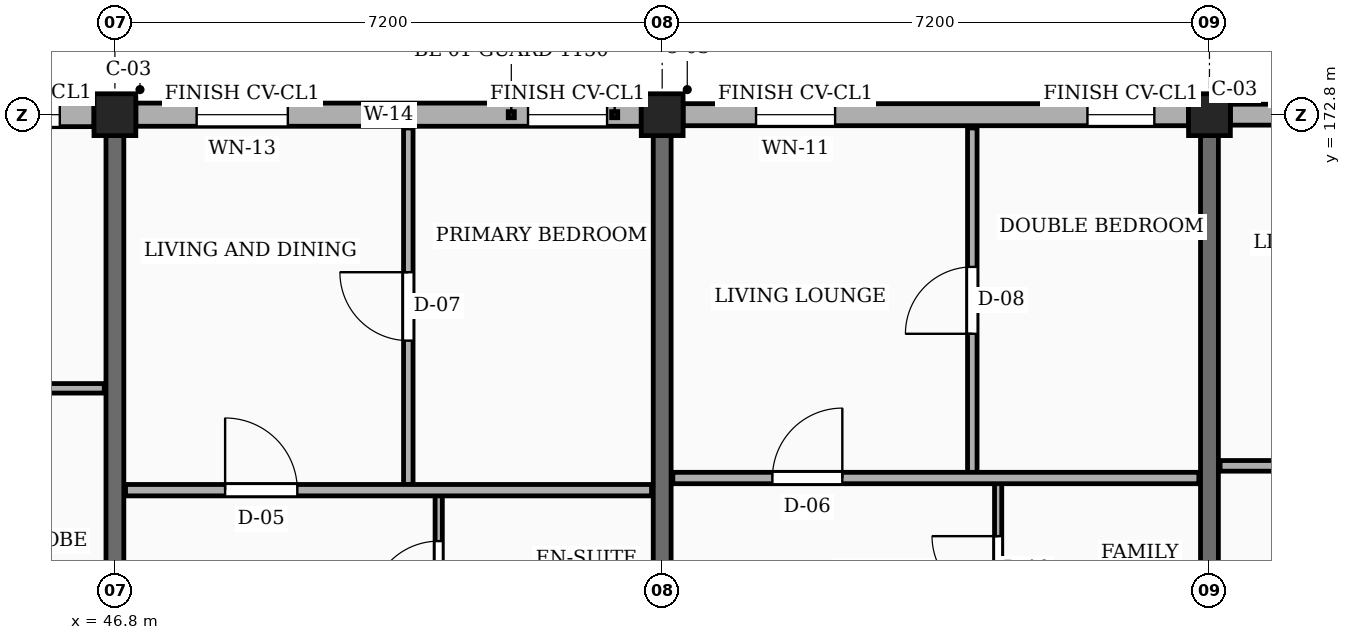
"""IFC4 building model, lengths in metres.
Left out: names, types, materials, properties, quantities, classifications, styles, units other than length and angle.
Written with IfcOpenShell. Run it as: python <this file> out.ifc"""

import sys

from ifc_helpers import new_model, si_unit, direction, frame, frame_2d, origin, origin_2d, place, context, subcontext, project, spatial, rectangle, extrude, element, fill, save


model = new_model("IFC4")
c1 = context("Model", 3, precision=1e-05, world=origin(), true_north=direction((0.0, 1.0)))
c2 = subcontext(c1, "Body", "Model", "MODEL_VIEW")
j1 = project(units=[si_unit("LENGTHUNIT", "METRE"), si_unit("PLANEANGLEUNIT", "RADIAN")], contexts=[c1])
p1 = place(None, origin())
s1 = spatial("IfcSite", under=j1, at=p1, CompositionType="ELEMENT")
p2 = place(p1, origin())
s2 = spatial("IfcBuilding", under=s1, at=p2, CompositionType="ELEMENT")
p3 = place(p2, frame((0.0, 0.0, 13.95)))
s3 = spatial("IfcBuildingStorey", under=s2, at=p3, CompositionType="ELEMENT", Elevation=13.95)
for number, where, z_axis, x_axis in (
    (1, (46.8, 172.8, 0.0), (0.0, 0.0, 1.0), (1.0, 0.0, 0.0)),
    (2, (54.0, 172.8, 0.0), (0.0, 0.0, 1.0), (1.0, 0.0, 0.0)),
    (3, (61.2, 172.8, 0.0), (0.0, 0.0, 1.0), (1.0, 0.0, 0.0)),
):
    element("IfcColumn", number, at=place(p3, frame(where, z_axis=z_axis, x_axis=x_axis)), inside=s3, PredefinedType="COLUMN", context=c2, shape_type="SweptSolid", body=[
        extrude(rectangle(XDim=0.55, YDim=0.55, at=origin_2d()), origin(), (0.0, 0.0, 1.0), 3.15),
    ])
for number, where, z_axis, x_axis in (
    (4, (46.8, 165.925, 0.0), (0.0, 0.0, 1.0), (0.0, 1.0, 0.0)),
    (5, (54.0, 165.925, 0.0), (0.0, 0.0, 1.0), (0.0, 1.0, 0.0)),
    (6, (61.2, 165.925, 0.0), (0.0, 0.0, 1.0), (0.0, 1.0, 0.0)),
):
    element("IfcWall", number, at=place(p3, frame(where, z_axis=z_axis, x_axis=x_axis)), inside=s3, PredefinedType="SOLIDWALL", context=c2, shape_type="SweptSolid", body=[
        extrude(rectangle(XDim=6.6, YDim=0.235, at=frame_2d((3.3, 0.0))), origin(), (0.0, 0.0, 1.0), 2.185),
    ])
p4 = place(p3, frame((68.125, 172.8, 0.0), z_axis=(0.0, 0.0, 1.0), x_axis=(-1.0, 0.0, 0.0)))
e7 = element("IfcWall", 7, at=p4, inside=s3, PredefinedType="SOLIDWALL", context=c2, shape_type="SweptSolid", body=[
    extrude(rectangle(XDim=6.65, YDim=0.275, at=frame_2d((3.325, 0.0))), origin(), (0.0, 0.0, 1.0), 2.455),
])
p5 = place(p4, frame((0.45, 0.0, 0.78)))
e8 = element("IfcOpeningElement", 8, at=p5, cuts=e7, PredefinedType="OPENING", context=c2, shape_type="SweptSolid", body=[
    extrude(rectangle(XDim=1.32, YDim=1.15, at=frame_2d((0.66, 0.575))), frame((0.0, 0.147, 0.0), z_axis=(0.0, -1.0, 0.0), x_axis=(1.0, 0.0, 0.0)), (0.0, 0.0, 1.0), 0.295),
])
p6 = place(p4, frame((4.65, 0.0, 0.78)))
e9 = element("IfcOpeningElement", 9, at=p6, cuts=e7, PredefinedType="OPENING", context=c2, shape_type="SweptSolid", body=[
    extrude(rectangle(XDim=0.88, YDim=1.26, at=frame_2d((0.44, 0.63))), frame((0.0, 0.147, 0.0), z_axis=(0.0, -1.0, 0.0), x_axis=(1.0, 0.0, 0.0)), (0.0, 0.0, 1.0), 0.295),
])
p7 = place(p3, frame((60.925, 172.8, 0.0), z_axis=(0.0, 0.0, 1.0), x_axis=(-1.0, 0.0, 0.0)))
e10 = element("IfcWall", 10, at=p7, inside=s3, PredefinedType="SOLIDWALL", context=c2, shape_type="SweptSolid", body=[
    extrude(rectangle(XDim=6.65, YDim=0.29, at=frame_2d((3.325, 0.0))), origin(), (0.0, 0.0, 1.0), 2.455),
])
p8 = place(p7, frame((0.45, 0.0, 0.78)))
e11 = element("IfcOpeningElement", 11, at=p8, cuts=e10, PredefinedType="OPENING", context=c2, shape_type="SweptSolid", body=[
    extrude(rectangle(XDim=0.88, YDim=1.26, at=frame_2d((0.44, 0.63))), frame((0.0, 0.155, 0.0), z_axis=(0.0, -1.0, 0.0), x_axis=(1.0, 0.0, 0.0)), (0.0, 0.0, 1.0), 0.31),
])
p9 = place(p7, frame((4.65, 0.0, 0.78)))
e12 = element("IfcOpeningElement", 12, at=p9, cuts=e10, PredefinedType="OPENING", context=c2, shape_type="SweptSolid", body=[
    extrude(rectangle(XDim=1.04, YDim=1.26, at=frame_2d((0.52, 0.63))), frame((0.0, 0.155, 0.0), z_axis=(0.0, -1.0, 0.0), x_axis=(1.0, 0.0, 0.0)), (0.0, 0.0, 1.0), 0.31),
])
p10 = place(p3, frame((53.725, 172.8, 0.0), z_axis=(0.0, 0.0, 1.0), x_axis=(-1.0, 0.0, 0.0)))
e13 = element("IfcWall", 13, at=p10, inside=s3, PredefinedType="SOLIDWALL", context=c2, shape_type="SweptSolid", body=[
    extrude(rectangle(XDim=6.65, YDim=0.305, at=frame_2d((3.325, 0.0))), origin(), (0.0, 0.0, 1.0), 2.455),
])
p11 = place(p10, frame((0.45, 0.0, 0.78)))
e14 = element("IfcOpeningElement", 14, at=p11, cuts=e13, PredefinedType="OPENING", context=c2, shape_type="SweptSolid", body=[
    extrude(rectangle(XDim=1.04, YDim=1.26, at=frame_2d((0.52, 0.63))), frame((0.0, 0.163, 0.0), z_axis=(0.0, -1.0, 0.0), x_axis=(1.0, 0.0, 0.0)), (0.0, 0.0, 1.0), 0.325),
])
p12 = place(p10, frame((4.65, 0.0, 0.78)))
e15 = element("IfcOpeningElement", 15, at=p12, cuts=e13, PredefinedType="OPENING", context=c2, shape_type="SweptSolid", body=[
    extrude(rectangle(XDim=1.2, YDim=1.26, at=frame_2d((0.6, 0.63))), frame((0.0, 0.163, 0.0), z_axis=(0.0, -1.0, 0.0), x_axis=(1.0, 0.0, 0.0)), (0.0, 0.0, 1.0), 0.325),
])
p13 = place(p3, frame((46.525, 172.8, 0.0), z_axis=(0.0, 0.0, 1.0), x_axis=(-1.0, 0.0, 0.0)))
e16 = element("IfcWall", 16, at=p13, inside=s3, PredefinedType="SOLIDWALL", context=c2, shape_type="SweptSolid", body=[
    extrude(rectangle(XDim=6.65, YDim=0.315, at=frame_2d((3.325, 0.0))), origin(), (0.0, 0.0, 1.0), 2.455),
])
p14 = place(p13, frame((0.45, 0.0, 0.78)))
e17 = element("IfcOpeningElement", 17, at=p14, cuts=e16, PredefinedType="OPENING", context=c2, shape_type="SweptSolid", body=[
    extrude(rectangle(XDim=1.2, YDim=1.26, at=frame_2d((0.6, 0.63))), frame((0.0, 0.167, 0.0), z_axis=(0.0, -1.0, 0.0), x_axis=(1.0, 0.0, 0.0)), (0.0, 0.0, 1.0), 0.335),
])
p15 = place(p13, frame((4.65, 0.0, 0.78)))
e18 = element("IfcOpeningElement", 18, at=p15, cuts=e16, PredefinedType="OPENING", context=c2, shape_type="SweptSolid", body=[
    extrude(rectangle(XDim=1.36, YDim=1.26, at=frame_2d((0.68, 0.63))), frame((0.0, 0.167, 0.0), z_axis=(0.0, -1.0, 0.0), x_axis=(1.0, 0.0, 0.0)), (0.0, 0.0, 1.0), 0.335),
])
p16 = place(p3, frame((39.74, 169.2, 0.0), z_axis=(0.0, 0.0, 1.0), x_axis=(1.0, 0.0, 0.0)))
e19 = element("IfcWall", 19, at=p16, inside=s3, PredefinedType="PARTITIONING", context=c2, shape_type="SweptSolid", body=[
    extrude(rectangle(XDim=6.92, YDim=0.125, at=frame_2d((3.46, 0.0))), origin(), (0.0, 0.0, 1.0), 2.32),
])
p17 = place(p16, frame((1.05, 0.0, 0.0)))
e20 = element("IfcOpeningElement", 20, at=p17, cuts=e19, PredefinedType="OPENING", context=c2, shape_type="SweptSolid", body=[
    extrude(rectangle(XDim=0.87, YDim=2.05, at=frame_2d((0.435, 1.025))), frame((0.0, 0.073, 0.0), z_axis=(0.0, -1.0, 0.0), x_axis=(1.0, 0.0, 0.0)), (0.0, 0.0, 1.0), 0.145),
])
p18 = place(p16, frame((4.45, 0.0, 0.0)))
e21 = element("IfcOpeningElement", 21, at=p18, cuts=e19, PredefinedType="OPENING", context=c2, shape_type="SweptSolid", body=[
    extrude(rectangle(XDim=0.88, YDim=2.08, at=frame_2d((0.44, 1.04))), frame((0.0, 0.073, 0.0), z_axis=(0.0, -1.0, 0.0), x_axis=(1.0, 0.0, 0.0)), (0.0, 0.0, 1.0), 0.145),
])
p19 = place(p3, frame((50.66, 167.93, 0.0), z_axis=(0.0, 0.0, 1.0), x_axis=(0.0, 1.0, 0.0)))
e22 = element("IfcWall", 22, at=p19, inside=s3, PredefinedType="PARTITIONING", context=c2, shape_type="SweptSolid", body=[
    extrude(rectangle(XDim=4.695, YDim=0.125, at=frame_2d((2.348, 0.0))), origin(), (0.0, 0.0, 1.0), 2.32),
])
p20 = place(p19, frame((1.897, 0.0, 0.0)))
e23 = element("IfcOpeningElement", 23, at=p20, cuts=e22, PredefinedType="OPENING", context=c2, shape_type="SweptSolid", body=[
    extrude(rectangle(XDim=0.9, YDim=2.1, at=frame_2d((0.45, 1.05))), frame((0.0, 0.073, 0.0), z_axis=(0.0, -1.0, 0.0), x_axis=(1.0, 0.0, 0.0)), (0.0, 0.0, 1.0), 0.145),
])
p21 = place(p3, frame((51.06, 165.69, 0.0), z_axis=(0.0, 0.0, 1.0), x_axis=(0.0, 1.0, 0.0)))
e24 = element("IfcWall", 24, at=p21, inside=s3, PredefinedType="PARTITIONING", context=c2, shape_type="SweptSolid", body=[
    extrude(rectangle(XDim=2.1, YDim=0.095, at=frame_2d((1.05, 0.0))), origin(), (0.0, 0.0, 1.0), 2.32),
])
p22 = place(p21, frame((0.6, 0.0, 0.0)))
e25 = element("IfcOpeningElement", 25, at=p22, cuts=e24, PredefinedType="OPENING", context=c2, shape_type="SweptSolid", body=[
    extrude(rectangle(XDim=0.9, YDim=2.05, at=frame_2d((0.45, 1.025))), frame((0.0, 0.058, 0.0), z_axis=(0.0, -1.0, 0.0), x_axis=(1.0, 0.0, 0.0)), (0.0, 0.0, 1.0), 0.115),
])
p23 = place(p3, frame((46.94, 167.86, 0.0), z_axis=(0.0, 0.0, 1.0), x_axis=(1.0, 0.0, 0.0)))
e26 = element("IfcWall", 26, at=p23, inside=s3, PredefinedType="PARTITIONING", context=c2, shape_type="SweptSolid", body=[
    extrude(rectangle(XDim=6.92, YDim=0.15, at=frame_2d((3.46, 0.0))), origin(), (0.0, 0.0, 1.0), 2.32),
])
p24 = place(p23, frame((1.31, 0.0, 0.0)))
e27 = element("IfcOpeningElement", 27, at=p24, cuts=e26, PredefinedType="OPENING", context=c2, shape_type="SweptSolid", body=[
    extrude(rectangle(XDim=0.95, YDim=2.1, at=frame_2d((0.475, 1.05))), frame((0.0, 0.085, 0.0), z_axis=(0.0, -1.0, 0.0), x_axis=(1.0, 0.0, 0.0)), (0.0, 0.0, 1.0), 0.17),
])
p25 = place(p3, frame((58.08, 168.09, 0.0), z_axis=(0.0, 0.0, 1.0), x_axis=(0.0, 1.0, 0.0)))
e28 = element("IfcWall", 28, at=p25, inside=s3, PredefinedType="PARTITIONING", context=c2, shape_type="SweptSolid", body=[
    extrude(rectangle(XDim=4.535, YDim=0.125, at=frame_2d((2.268, 0.0))), origin(), (0.0, 0.0, 1.0), 2.32),
])
p26 = place(p25, frame((1.827, 0.0, 0.0)))
e29 = element("IfcOpeningElement", 29, at=p26, cuts=e28, PredefinedType="OPENING", context=c2, shape_type="SweptSolid", body=[
    extrude(rectangle(XDim=0.88, YDim=2.08, at=frame_2d((0.44, 1.04))), frame((0.0, 0.073, 0.0), z_axis=(0.0, -1.0, 0.0), x_axis=(1.0, 0.0, 0.0)), (0.0, 0.0, 1.0), 0.145),
])
p27 = place(p3, frame((58.42, 165.69, 0.0), z_axis=(0.0, 0.0, 1.0), x_axis=(0.0, 1.0, 0.0)))
e30 = element("IfcWall", 30, at=p27, inside=s3, PredefinedType="PARTITIONING", context=c2, shape_type="SweptSolid", body=[
    extrude(rectangle(XDim=2.26, YDim=0.095, at=frame_2d((1.13, 0.0))), origin(), (0.0, 0.0, 1.0), 2.32),
])
p28 = place(p27, frame((0.695, 0.0, 0.0)))
e31 = element("IfcOpeningElement", 31, at=p28, cuts=e30, PredefinedType="OPENING", context=c2, shape_type="SweptSolid", body=[
    extrude(rectangle(XDim=0.87, YDim=2.05, at=frame_2d((0.435, 1.025))), frame((0.0, 0.058, 0.0), z_axis=(0.0, -1.0, 0.0), x_axis=(1.0, 0.0, 0.0)), (0.0, 0.0, 1.0), 0.115),
])
p29 = place(p3, frame((54.14, 168.02, 0.0), z_axis=(0.0, 0.0, 1.0), x_axis=(1.0, 0.0, 0.0)))
e32 = element("IfcWall", 32, at=p29, inside=s3, PredefinedType="PARTITIONING", context=c2, shape_type="SweptSolid", body=[
    extrude(rectangle(XDim=6.92, YDim=0.15, at=frame_2d((3.46, 0.0))), origin(), (0.0, 0.0, 1.0), 2.32),
])
p30 = place(p29, frame((1.31, 0.0, 0.0)))
e33 = element("IfcOpeningElement", 33, at=p30, cuts=e32, PredefinedType="OPENING", context=c2, shape_type="SweptSolid", body=[
    extrude(rectangle(XDim=0.92, YDim=2.1, at=frame_2d((0.46, 1.05))), frame((0.0, 0.085, 0.0), z_axis=(0.0, -1.0, 0.0), x_axis=(1.0, 0.0, 0.0)), (0.0, 0.0, 1.0), 0.17),
])
p31 = place(p3, frame((61.34, 168.18, 0.0), z_axis=(0.0, 0.0, 1.0), x_axis=(1.0, 0.0, 0.0)))
e34 = element("IfcWall", 34, at=p31, inside=s3, PredefinedType="PARTITIONING", context=c2, shape_type="SweptSolid", body=[
    extrude(rectangle(XDim=6.92, YDim=0.14, at=frame_2d((3.46, 0.0))), origin(), (0.0, 0.0, 1.0), 2.32),
])
p32 = place(p31, frame((1.31, 0.0, 0.0)))
e35 = element("IfcOpeningElement", 35, at=p32, cuts=e34, PredefinedType="OPENING", context=c2, shape_type="SweptSolid", body=[
    extrude(rectangle(XDim=0.95, YDim=2.1, at=frame_2d((0.475, 1.05))), frame((0.0, 0.08, 0.0), z_axis=(0.0, -1.0, 0.0), x_axis=(1.0, 0.0, 0.0)), (0.0, 0.0, 1.0), 0.16),
])
p33 = place(p8, origin())
e36 = element("IfcWindow", 36, at=p33, inside=s3, PartitioningType="SINGLE_PANEL", PredefinedType="WINDOW", context=c2, shape_type="SweptSolid", body=[
    extrude(rectangle(XDim=0.88, YDim=1.26, at=frame_2d((0.44, 0.63))), frame((0.0, 0.03, 0.0), z_axis=(0.0, -1.0, 0.0), x_axis=(1.0, 0.0, 0.0)), (0.0, 0.0, 1.0), 0.06),
])
fill(e11, e36)
p34 = place(p9, origin())
e37 = element("IfcWindow", 37, at=p34, inside=s3, PartitioningType="SINGLE_PANEL", PredefinedType="WINDOW", context=c2, shape_type="SweptSolid", body=[
    extrude(rectangle(XDim=1.04, YDim=1.26, at=frame_2d((0.52, 0.63))), frame((0.0, 0.03, 0.0), z_axis=(0.0, -1.0, 0.0), x_axis=(1.0, 0.0, 0.0)), (0.0, 0.0, 1.0), 0.06),
])
fill(e12, e37)
p35 = place(p11, origin())
e38 = element("IfcWindow", 38, at=p35, inside=s3, PartitioningType="SINGLE_PANEL", PredefinedType="WINDOW", context=c2, shape_type="SweptSolid", body=[
    extrude(rectangle(XDim=1.04, YDim=1.26, at=frame_2d((0.52, 0.63))), frame((0.0, 0.03, 0.0), z_axis=(0.0, -1.0, 0.0), x_axis=(1.0, 0.0, 0.0)), (0.0, 0.0, 1.0), 0.06),
])
fill(e14, e38)
p36 = place(p12, origin())
e39 = element("IfcWindow", 39, at=p36, inside=s3, PartitioningType="SINGLE_PANEL", PredefinedType="WINDOW", context=c2, shape_type="SweptSolid", body=[
    extrude(rectangle(XDim=1.2, YDim=1.26, at=frame_2d((0.6, 0.63))), frame((0.0, 0.03, 0.0), z_axis=(0.0, -1.0, 0.0), x_axis=(1.0, 0.0, 0.0)), (0.0, 0.0, 1.0), 0.06),
])
fill(e15, e39)
p37 = place(p14, origin())
e40 = element("IfcWindow", 40, at=p37, inside=s3, PartitioningType="SINGLE_PANEL", PredefinedType="WINDOW", context=c2, shape_type="SweptSolid", body=[
    extrude(rectangle(XDim=1.2, YDim=1.26, at=frame_2d((0.6, 0.63))), frame((0.0, 0.03, 0.0), z_axis=(0.0, -1.0, 0.0), x_axis=(1.0, 0.0, 0.0)), (0.0, 0.0, 1.0), 0.06),
])
fill(e17, e40)
p38 = place(p20, origin())
e41 = element("IfcDoor", 41, at=p38, inside=s3, OperationType="SINGLE_SWING_RIGHT", PredefinedType="DOOR", context=c2, shape_type="SweptSolid", body=[
    extrude(rectangle(XDim=0.9, YDim=2.1, at=frame_2d((0.45, 1.05))), frame((0.0, 0.025, 0.0), z_axis=(0.0, -1.0, 0.0), x_axis=(1.0, 0.0, 0.0)), (0.0, 0.0, 1.0), 0.05),
])
fill(e23, e41)
p39 = place(p22, origin())
e42 = element("IfcDoor", 42, at=p39, inside=s3, OperationType="SINGLE_SWING_LEFT", PredefinedType="DOOR", context=c2, shape_type="SweptSolid", body=[
    extrude(rectangle(XDim=0.9, YDim=2.05, at=frame_2d((0.45, 1.025))), frame((0.0, 0.025, 0.0), z_axis=(0.0, -1.0, 0.0), x_axis=(1.0, 0.0, 0.0)), (0.0, 0.0, 1.0), 0.05),
])
fill(e25, e42)
p40 = place(p24, origin())
e43 = element("IfcDoor", 43, at=p40, inside=s3, OperationType="SINGLE_SWING_LEFT", PredefinedType="DOOR", context=c2, shape_type="SweptSolid", body=[
    extrude(rectangle(XDim=0.95, YDim=2.1, at=frame_2d((0.475, 1.05))), frame((0.0, 0.025, 0.0), z_axis=(0.0, -1.0, 0.0), x_axis=(1.0, 0.0, 0.0)), (0.0, 0.0, 1.0), 0.05),
])
fill(e27, e43)
p41 = place(p26, origin())
e44 = element("IfcDoor", 44, at=p41, inside=s3, OperationType="SINGLE_SWING_LEFT", PredefinedType="DOOR", context=c2, shape_type="SweptSolid", body=[
    extrude(rectangle(XDim=0.88, YDim=2.08, at=frame_2d((0.44, 1.04))), frame((0.0, 0.025, 0.0), z_axis=(0.0, -1.0, 0.0), x_axis=(1.0, 0.0, 0.0)), (0.0, 0.0, 1.0), 0.05),
])
fill(e29, e44)
p42 = place(p28, origin())
e45 = element("IfcDoor", 45, at=p42, inside=s3, OperationType="SINGLE_SWING_RIGHT", PredefinedType="DOOR", context=c2, shape_type="SweptSolid", body=[
    extrude(rectangle(XDim=0.87, YDim=2.05, at=frame_2d((0.435, 1.025))), frame((0.0, 0.025, 0.0), z_axis=(0.0, -1.0, 0.0), x_axis=(1.0, 0.0, 0.0)), (0.0, 0.0, 1.0), 0.05),
])
fill(e31, e45)
p43 = place(p30, origin())
e46 = element("IfcDoor", 46, at=p43, inside=s3, OperationType="SINGLE_SWING_RIGHT", PredefinedType="DOOR", context=c2, shape_type="SweptSolid", body=[
    extrude(rectangle(XDim=0.92, YDim=2.1, at=frame_2d((0.46, 1.05))), frame((0.0, 0.025, 0.0), z_axis=(0.0, -1.0, 0.0), x_axis=(1.0, 0.0, 0.0)), (0.0, 0.0, 1.0), 0.05),
])
fill(e33, e46)
save(model, sys.argv[1])
